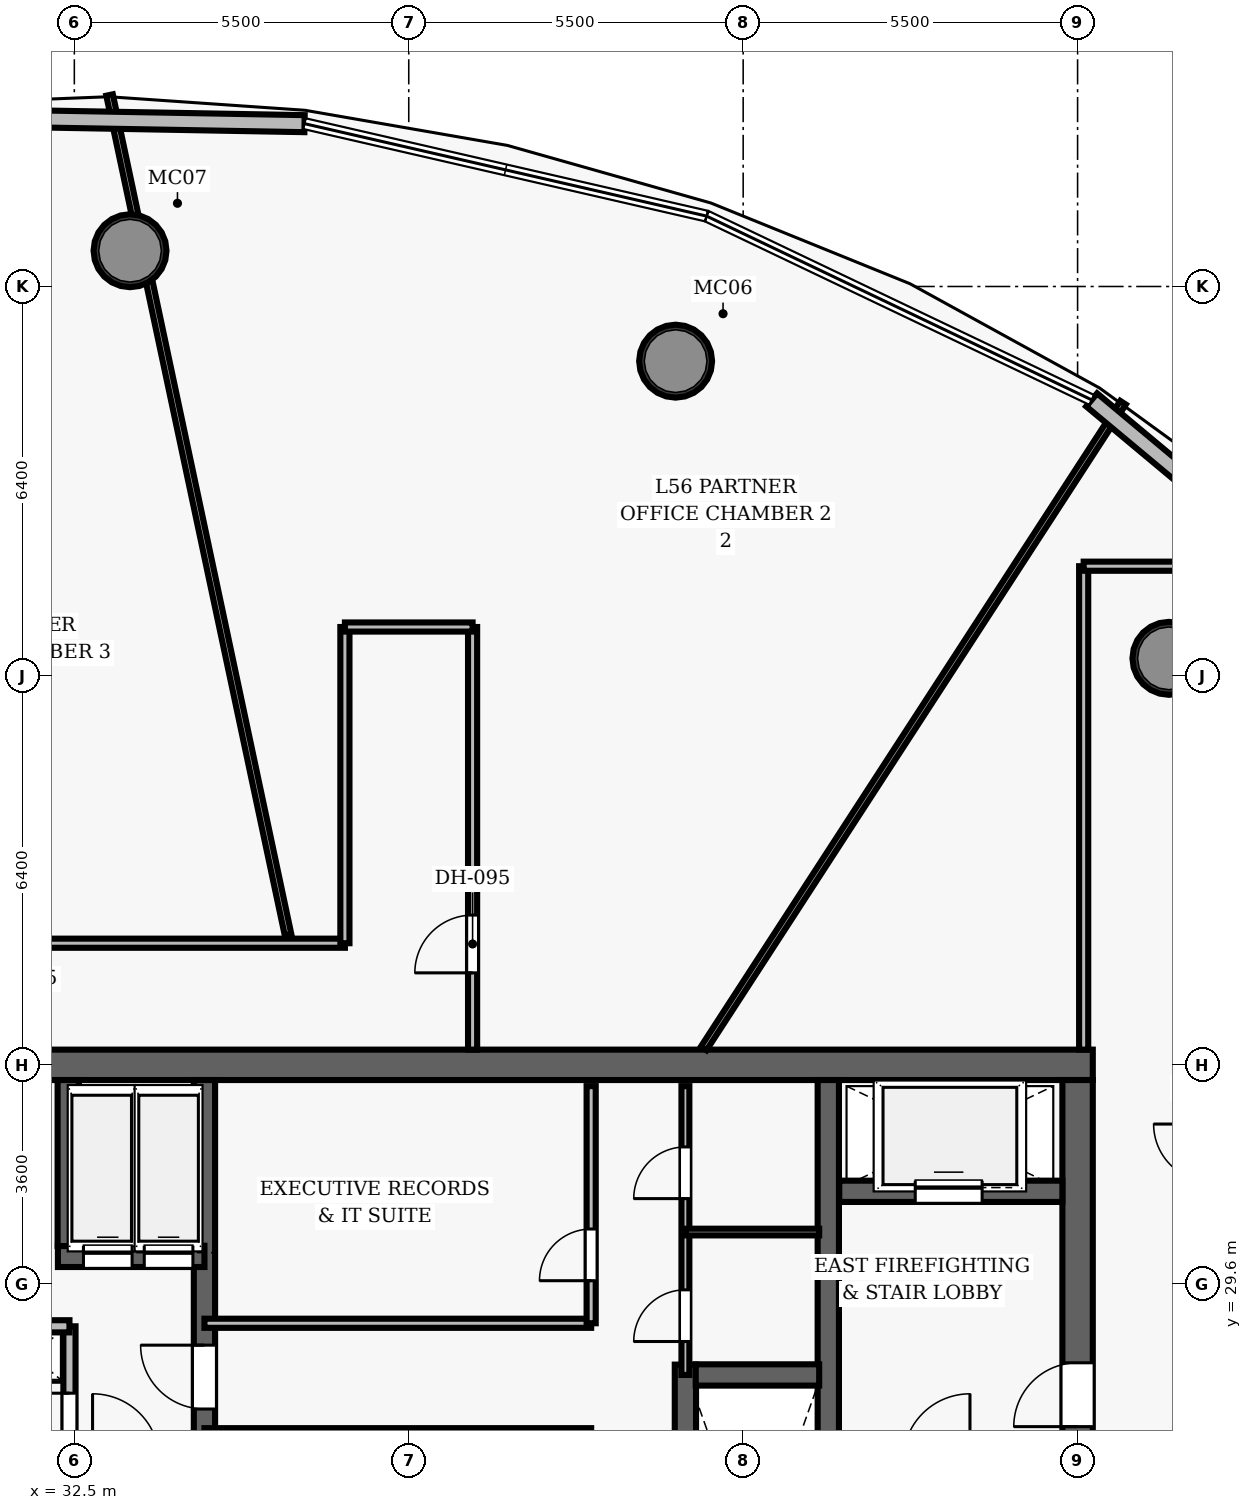
"""IFC4 building model, lengths in metres.
Left out: names, types, materials, properties, quantities, classifications, styles, units other than length and angle.
Written with IfcOpenShell. Run it as: python <this file> out.ifc"""

import sys

from ifc_helpers import new_model, si_unit, direction, frame, frame_2d, origin, origin_2d, place, context, subcontext, project, spatial, rectangle, hollow_circle, extrude, element, fill, save


model = new_model("IFC4")
c1 = context("Model", 3, precision=1e-05, world=origin(), true_north=direction((0.0, 1.0)))
c2 = subcontext(c1, "Body", "Model", "MODEL_VIEW")
j1 = project(units=[si_unit("LENGTHUNIT", "METRE"), si_unit("PLANEANGLEUNIT", "RADIAN")], contexts=[c1])
p1 = place(None, origin())
s1 = spatial("IfcSite", under=j1, at=p1, CompositionType="ELEMENT")
p2 = place(p1, origin())
s2 = spatial("IfcBuilding", under=s1, at=p2, CompositionType="ELEMENT")
p3 = place(p2, frame((0.0, 0.0, 221.25)))
s3 = spatial("IfcBuildingStorey", under=s2, at=p3, CompositionType="ELEMENT", Elevation=221.25)
p4 = place(p3, frame((26.75, 33.2, 0.0), z_axis=(0.0, 0.0, 1.0), x_axis=(1.0, 0.0, 0.0)))
e1 = element("IfcWall", 1, at=p4, inside=s3, PredefinedType="SHEAR", context=c2, shape_type="SweptSolid", body=[
    extrude(rectangle(XDim=22.5, YDim=0.5, at=frame_2d((11.25, 0.0))), origin(), (0.0, 0.0, 1.0), 3.85),
])
p5 = place(p3, frame((49.0, 19.05, 0.0), z_axis=(0.0, 0.0, 1.0), x_axis=(0.0, 1.0, 0.0)))
e2 = element("IfcWall", 2, at=p5, inside=s3, PredefinedType="SHEAR", context=c2, shape_type="SweptSolid", body=[
    extrude(rectangle(XDim=13.9, YDim=0.5, at=frame_2d((6.95, 0.0))), origin(), (0.0, 0.0, 1.0), 3.85),
])
p6 = place(p5, frame((8.2, 0.0, 0.0)))
e3 = element("IfcOpeningElement", 3, at=p6, cuts=e2, PredefinedType="OPENING", context=c2, shape_type="SweptSolid", body=[
    extrude(rectangle(XDim=1.05, YDim=2.15, at=frame_2d((0.525, 1.075))), frame((0.0, 0.26, 0.0), z_axis=(0.0, -1.0, 0.0), x_axis=(1.0, 0.0, 0.0)), (0.0, 0.0, 1.0), 0.52),
])
p7 = place(p3, frame((44.9, 19.05, 0.0), z_axis=(0.0, 0.0, 1.0), x_axis=(0.0, 1.0, 0.0)))
e4 = element("IfcWall", 4, at=p7, inside=s3, PredefinedType="SHEAR", context=c2, shape_type="SweptSolid", body=[
    extrude(rectangle(XDim=13.9, YDim=0.35, at=frame_2d((6.95, 0.0))), origin(), (0.0, 0.0, 1.0), 3.85),
])
for number, where, z_axis, x_axis in (
    (5, (50.502, 39.885, 0.0), (0.0, 0.0, 1.0), (1.0, 0.0, 0.0)),
    (6, (42.389, 44.772, 0.0), (0.0, 0.0, 1.0), (1.0, 0.0, 0.0)),
    (7, (33.416, 46.588, 0.0), (0.0, 0.0, 1.0), (1.0, 0.0, 0.0)),
):
    element("IfcColumn", number, at=place(p3, frame(where, z_axis=z_axis, x_axis=x_axis)), inside=s3, PredefinedType="COLUMN", context=c2, shape_type="SweptSolid", body=[
        extrude(hollow_circle(Radius=0.6, WallThickness=0.05, at=origin_2d()), origin(), (0.0, 0.0, 1.0), 3.85),
    ])
p8 = place(p3, frame((45.08, 31.12, 0.0), z_axis=(0.0, 0.0, 1.0), x_axis=(1.0, 0.0, 0.0)))
e8 = element("IfcWall", 8, at=p8, inside=s3, PredefinedType="SHEAR", context=c2, shape_type="SweptSolid", body=[
    extrude(rectangle(XDim=3.67, YDim=0.35, at=frame_2d((1.835, 0.0))), origin(), (0.0, 0.0, 1.0), 3.035),
])
p9 = place(p8, frame((1.25, 0.0, 0.0)))
e9 = element("IfcOpeningElement", 9, at=p9, cuts=e8, PredefinedType="OPENING", context=c2, shape_type="SweptSolid", body=[
    extrude(rectangle(XDim=1.1, YDim=2.15, at=frame_2d((0.55, 1.075))), frame((0.0, 0.185, 0.0), z_axis=(0.0, -1.0, 0.0), x_axis=(1.0, 0.0, 0.0)), (0.0, 0.0, 1.0), 0.37),
])
p10 = place(p3, frame((34.64, 26.69, 0.0), z_axis=(0.0, 0.0, 1.0), x_axis=(0.0, 1.0, 0.0)))
e10 = element("IfcWall", 10, at=p10, inside=s3, PredefinedType="SHEAR", context=c2, shape_type="SweptSolid", body=[
    extrude(rectangle(XDim=6.26, YDim=0.35, at=frame_2d((3.13, 0.0))), origin(), (0.0, 0.0, 1.0), 3.85),
])
p11 = place(p10, frame((0.85, 0.0, 0.0)))
e11 = element("IfcOpeningElement", 11, at=p11, cuts=e10, PredefinedType="OPENING", context=c2, shape_type="SweptSolid", body=[
    extrude(rectangle(XDim=1.05, YDim=2.15, at=frame_2d((0.525, 1.075))), frame((0.0, 0.185, 0.0), z_axis=(0.0, -1.0, 0.0), x_axis=(1.0, 0.0, 0.0)), (0.0, 0.0, 1.0), 0.37),
])
p12 = place(p3, frame((32.23, 30.05, 0.0), z_axis=(0.0, 0.0, 1.0), x_axis=(1.0, 0.0, 0.0)))
e12 = element("IfcWall", 12, at=p12, inside=s3, PredefinedType="SHEAR", context=c2, shape_type="SweptSolid", body=[
    extrude(rectangle(XDim=2.41, YDim=0.35, at=frame_2d((1.205, 0.0))), origin(), (0.0, 0.0, 1.0), 3.035),
])
p13 = place(p12, frame((0.42, 0.0, 0.0)))
e13 = element("IfcOpeningElement", 13, at=p13, cuts=e12, PredefinedType="OPENING", context=c2, shape_type="SweptSolid", body=[
    extrude(rectangle(XDim=0.8, YDim=2.15, at=frame_2d((0.4, 1.075))), frame((0.0, 0.185, 0.0), z_axis=(0.0, -1.0, 0.0), x_axis=(1.0, 0.0, 0.0)), (0.0, 0.0, 1.0), 0.37),
])
p14 = place(p12, frame((1.42, 0.0, 0.0)))
e14 = element("IfcOpeningElement", 14, at=p14, cuts=e12, PredefinedType="OPENING", context=c2, shape_type="SweptSolid", body=[
    extrude(rectangle(XDim=0.8, YDim=2.15, at=frame_2d((0.4, 1.075))), frame((0.0, 0.185, 0.0), z_axis=(0.0, -1.0, 0.0), x_axis=(1.0, 0.0, 0.0)), (0.0, 0.0, 1.0), 0.37),
])
p15 = place(p3, frame((32.4, 30.22, 0.0), z_axis=(0.0, 0.0, 1.0), x_axis=(0.0, 1.0, 0.0)))
e15 = element("IfcWall", 15, at=p15, inside=s3, PredefinedType="SHEAR", context=c2, shape_type="SweptSolid", body=[
    extrude(rectangle(XDim=2.73, YDim=0.35, at=frame_2d((1.365, 0.0))), origin(), (0.0, 0.0, 1.0), 3.035),
])
p16 = place(p3, frame((32.42, 26.86, 0.0), z_axis=(0.0, 0.0, 1.0), x_axis=(0.0, 1.0, 0.0)))
e16 = element("IfcWall", 16, at=p16, inside=s3, PredefinedType="PARTITIONING", context=c2, shape_type="SweptSolid", body=[
    extrude(rectangle(XDim=2.04, YDim=0.2, at=frame_2d((1.02, 0.0))), origin(), (0.0, 0.0, 1.0), 3.035),
])
p17 = place(p16, frame((0.14, 0.0, 0.0)))
e17 = element("IfcOpeningElement", 17, at=p17, cuts=e16, PredefinedType="OPENING", context=c2, shape_type="SweptSolid", body=[
    extrude(rectangle(XDim=0.8, YDim=2.05, at=frame_2d((0.4, 1.025))), frame((0.0, 0.11, 0.0), z_axis=(0.0, -1.0, 0.0), x_axis=(1.0, 0.0, 0.0)), (0.0, 0.0, 1.0), 0.22),
])
p18 = place(p3, frame((31.3, 28.9, 0.0), z_axis=(0.0, 0.0, 1.0), x_axis=(1.0, 0.0, 0.0)))
e18 = element("IfcWall", 18, at=p18, inside=s3, PredefinedType="PARTITIONING", context=c2, shape_type="SweptSolid", body=[
    extrude(rectangle(XDim=1.12, YDim=0.2, at=frame_2d((0.56, 0.0))), origin(), (0.0, 0.0, 1.0), 3.035),
])
p19 = place(p3, frame((42.55, 21.73, 0.0), z_axis=(0.0, 0.0, 1.0), x_axis=(0.0, 1.0, 0.0)))
e19 = element("IfcWall", 19, at=p19, inside=s3, PredefinedType="SHEAR", context=c2, shape_type="SweptSolid", body=[
    extrude(rectangle(XDim=6.54, YDim=0.35, at=frame_2d((3.27, 0.0))), origin(), (0.0, 0.0, 1.0), 3.035),
])
p20 = place(p3, frame((42.72, 28.1, 0.0), z_axis=(0.0, 0.0, 1.0), x_axis=(1.0, 0.0, 0.0)))
e20 = element("IfcWall", 20, at=p20, inside=s3, PredefinedType="SHEAR", context=c2, shape_type="SweptSolid", body=[
    extrude(rectangle(XDim=2.03, YDim=0.35, at=frame_2d((1.015, 0.0))), origin(), (0.0, 0.0, 1.0), 3.035),
])
for number, where, z_axis, x_axis in (
    (21, (34.64, 27.15, 0.0), (0.0, 0.0, 1.0), (1.0, 0.0, 0.0)),
    (22, (34.64, 28.95, 0.0), (0.0, 0.0, 1.0), (1.0, 0.0, 0.0)),
):
    element("IfcWall", number, at=place(p3, frame(where, z_axis=z_axis, x_axis=x_axis)), inside=s3, PredefinedType="PARTITIONING", context=c2, shape_type="SweptSolid", body=[
        extrude(rectangle(XDim=6.36, YDim=0.15, at=frame_2d((3.18, 0.0))), origin(), (0.0, 0.0, 1.0), 3.035),
    ])
p21 = place(p3, frame((41.0, 28.95, 0.0), z_axis=(0.0, 0.0, 1.0), x_axis=(0.0, 1.0, 0.0)))
e23 = element("IfcWall", 23, at=p21, inside=s3, PredefinedType="PARTITIONING", context=c2, shape_type="SweptSolid", body=[
    extrude(rectangle(XDim=3.9, YDim=0.15, at=frame_2d((1.95, 0.0))), origin(), (0.0, 0.0, 1.0), 3.035),
])
p22 = place(p21, frame((0.7, 0.0, 0.0)))
e24 = element("IfcOpeningElement", 24, at=p22, cuts=e23, PredefinedType="OPENING", context=c2, shape_type="SweptSolid", body=[
    extrude(rectangle(XDim=0.85, YDim=2.1, at=frame_2d((0.425, 1.05))), frame((0.0, 0.085, 0.0), z_axis=(0.0, -1.0, 0.0), x_axis=(1.0, 0.0, 0.0)), (0.0, 0.0, 1.0), 0.17),
])
p23 = place(p3, frame((42.55, 28.1, 0.0), z_axis=(0.0, 0.0, 1.0), x_axis=(0.0, 1.0, 0.0)))
e25 = element("IfcWall", 25, at=p23, inside=s3, PredefinedType="PARTITIONING", context=c2, shape_type="SweptSolid", body=[
    extrude(rectangle(XDim=4.75, YDim=0.13, at=frame_2d((2.375, 0.0))), origin(), (0.0, 0.0, 1.0), 3.035),
])
p24 = place(p23, frame((0.55, 0.0, 0.0)))
e26 = element("IfcOpeningElement", 26, at=p24, cuts=e25, PredefinedType="OPENING", context=c2, shape_type="SweptSolid", body=[
    extrude(rectangle(XDim=0.85, YDim=2.1, at=frame_2d((0.425, 1.05))), frame((0.0, 0.075, 0.0), z_axis=(0.0, -1.0, 0.0), x_axis=(1.0, 0.0, 0.0)), (0.0, 0.0, 1.0), 0.15),
])
p25 = place(p23, frame((2.9, 0.0, 0.0)))
e27 = element("IfcOpeningElement", 27, at=p25, cuts=e25, PredefinedType="OPENING", context=c2, shape_type="SweptSolid", body=[
    extrude(rectangle(XDim=0.85, YDim=2.1, at=frame_2d((0.425, 1.05))), frame((0.0, 0.075, 0.0), z_axis=(0.0, -1.0, 0.0), x_axis=(1.0, 0.0, 0.0)), (0.0, 0.0, 1.0), 0.15),
])
p26 = place(p3, frame((42.55, 30.45, 0.0), z_axis=(0.0, 0.0, 1.0), x_axis=(1.0, 0.0, 0.0)))
e28 = element("IfcWall", 28, at=p26, inside=s3, PredefinedType="PARTITIONING", context=c2, shape_type="SweptSolid", body=[
    extrude(rectangle(XDim=2.2, YDim=0.11, at=frame_2d((1.1, 0.0))), origin(), (0.0, 0.0, 1.0), 3.035),
])
p27 = place(p3, frame((26.9, 35.2, 0.0), z_axis=(0.0, 0.0, 1.0), x_axis=(1.0, 0.0, 0.0)))
e29 = element("IfcWall", 29, at=p27, inside=s3, PredefinedType="PARTITIONING", context=c2, shape_type="SweptSolid", body=[
    extrude(rectangle(XDim=10.05, YDim=0.15, at=frame_2d((5.025, 0.0))), origin(), (0.0, 0.0, 1.0), 3.035),
])
p28 = place(p27, frame((4.233, 0.0, 0.0)))
e30 = element("IfcOpeningElement", 30, at=p28, cuts=e29, PredefinedType="OPENING", context=c2, shape_type="SweptSolid", body=[
    extrude(rectangle(XDim=0.95, YDim=2.15, at=frame_2d((0.475, 1.075))), frame((0.0, 0.085, 0.0), z_axis=(0.0, -1.0, 0.0), x_axis=(1.0, 0.0, 0.0)), (0.0, 0.0, 1.0), 0.17),
])
p29 = place(p3, frame((49.1, 33.45, 0.0), z_axis=(0.0, 0.0, 1.0), x_axis=(0.0, 1.0, 0.0)))
e31 = element("IfcWall", 31, at=p29, inside=s3, PredefinedType="PARTITIONING", context=c2, shape_type="SweptSolid", body=[
    extrude(rectangle(XDim=7.95, YDim=0.15, at=frame_2d((3.975, 0.0))), origin(), (0.0, 0.0, 1.0), 3.035),
])
p30 = place(p3, frame((49.1, 41.4, 0.0), z_axis=(0.0, 0.0, 1.0), x_axis=(1.0, 0.0, 0.0)))
e32 = element("IfcWall", 32, at=p30, inside=s3, PredefinedType="PARTITIONING", context=c2, shape_type="SweptSolid", body=[
    extrude(rectangle(XDim=2.1, YDim=0.15, at=frame_2d((1.05, 0.0))), origin(), (0.0, 0.0, 1.0), 3.035),
])
p31 = place(p3, frame((36.95, 35.2, 0.0), z_axis=(0.0, 0.0, 1.0), x_axis=(0.0, 1.0, 0.0)))
e33 = element("IfcWall", 33, at=p31, inside=s3, PredefinedType="PARTITIONING", context=c2, shape_type="SweptSolid", body=[
    extrude(rectangle(XDim=5.2, YDim=0.15, at=frame_2d((2.6, 0.0))), origin(), (0.0, 0.0, 1.0), 3.035),
])
p32 = place(p3, frame((39.05, 33.45, 0.0), z_axis=(0.0, 0.0, 1.0), x_axis=(0.0, 1.0, 0.0)))
e34 = element("IfcWall", 34, at=p32, inside=s3, PredefinedType="PARTITIONING", context=c2, shape_type="SweptSolid", body=[
    extrude(rectangle(XDim=6.95, YDim=0.15, at=frame_2d((3.475, 0.0))), origin(), (0.0, 0.0, 1.0), 3.035),
])
p33 = place(p32, frame((1.262, 0.0, 0.0)))
e35 = element("IfcOpeningElement", 35, at=p33, cuts=e34, PredefinedType="OPENING", context=c2, shape_type="SweptSolid", body=[
    extrude(rectangle(XDim=0.95, YDim=2.15, at=frame_2d((0.475, 1.075))), frame((0.0, 0.085, 0.0), z_axis=(0.0, -1.0, 0.0), x_axis=(1.0, 0.0, 0.0)), (0.0, 0.0, 1.0), 0.17),
])
p34 = place(p3, frame((36.95, 40.4, 0.0), z_axis=(0.0, 0.0, 1.0), x_axis=(1.0, 0.0, 0.0)))
e36 = element("IfcWall", 36, at=p34, inside=s3, PredefinedType="PARTITIONING", context=c2, shape_type="SweptSolid", body=[
    extrude(rectangle(XDim=2.1, YDim=0.15, at=frame_2d((1.05, 0.0))), origin(), (0.0, 0.0, 1.0), 3.035),
])
p35 = place(p3, frame((42.851, 33.47, 0.0), z_axis=(0.0, 0.0, 1.0), x_axis=(0.544635209489, 0.838673052259, 0.0)))
e37 = element("IfcWall", 37, at=p35, inside=s3, PredefinedType="PARTITIONING", context=c2, shape_type="SweptSolid", body=[
    extrude(rectangle(XDim=12.662, YDim=0.11, at=frame_2d((6.331, 0.0))), origin(), (0.0, 0.0, 1.0), 3.035),
])
p36 = place(p3, frame((36.015, 35.34, 0.0), z_axis=(0.0, 0.0, 1.0), x_axis=(-0.207901362198, 0.978149796093, 0.0)))
e38 = element("IfcWall", 38, at=p36, inside=s3, PredefinedType="PARTITIONING", context=c2, shape_type="SweptSolid", body=[
    extrude(rectangle(XDim=14.117, YDim=0.11, at=frame_2d((7.059, 0.0))), origin(), (0.0, 0.0, 1.0), 3.035),
])
p37 = place(p3, frame((49.232, 44.135, 0.0), z_axis=(0.0, 0.0, 1.0), x_axis=(0.767687026112, -0.640824960453, 0.0)))
e39 = element("IfcWall", 39, at=p37, inside=s3, PredefinedType="SOLIDWALL", context=c2, shape_type="SweptSolid", body=[
    extrude(rectangle(XDim=7.045, YDim=0.28, at=frame_2d((3.523, 0.0))), origin(), (0.0, 0.0, 1.0), 3.62),
])
p38 = place(p3, frame((30.061, 48.789, 0.0), z_axis=(0.0, 0.0, 1.0), x_axis=(0.999840836748, -0.01784099693, 0.0)))
e40 = element("IfcWall", 40, at=p38, inside=s3, PredefinedType="SOLIDWALL", context=c2, shape_type="SweptSolid", body=[
    extrude(rectangle(XDim=6.226, YDim=0.28, at=frame_2d((3.113, 0.0))), origin(), (0.0, 0.0, 1.0), 3.62),
])
p39 = place(p6, origin())
e41 = element("IfcDoor", 41, at=p39, inside=s3, OperationType="SINGLE_SWING_LEFT", PredefinedType="DOOR", context=c2, shape_type="SweptSolid", body=[
    extrude(rectangle(XDim=1.05, YDim=2.15, at=frame_2d((0.525, 1.075))), frame((0.0, 0.025, 0.0), z_axis=(0.0, -1.0, 0.0), x_axis=(1.0, 0.0, 0.0)), (0.0, 0.0, 1.0), 0.05),
])
fill(e3, e41)
p40 = place(p17, origin())
e42 = element("IfcDoor", 42, at=p40, inside=s3, OperationType="SINGLE_SWING_RIGHT", PredefinedType="DOOR", context=c2, shape_type="SweptSolid", body=[
    extrude(rectangle(XDim=0.8, YDim=2.05, at=frame_2d((0.4, 1.025))), frame((0.0, 0.025, 0.0), z_axis=(0.0, -1.0, 0.0), x_axis=(1.0, 0.0, 0.0)), (0.0, 0.0, 1.0), 0.05),
])
fill(e17, e42)
p41 = place(p11, origin())
e43 = element("IfcDoor", 43, at=p41, inside=s3, OperationType="SINGLE_SWING_RIGHT", PredefinedType="DOOR", context=c2, shape_type="SweptSolid", body=[
    extrude(rectangle(XDim=1.05, YDim=2.15, at=frame_2d((0.525, 1.075))), frame((0.0, 0.025, 0.0), z_axis=(0.0, -1.0, 0.0), x_axis=(1.0, 0.0, 0.0)), (0.0, 0.0, 1.0), 0.05),
])
fill(e11, e43)
p42 = place(p22, origin())
e44 = element("IfcDoor", 44, at=p42, inside=s3, OperationType="SINGLE_SWING_LEFT", PredefinedType="DOOR", context=c2, shape_type="SweptSolid", body=[
    extrude(rectangle(XDim=0.85, YDim=2.1, at=frame_2d((0.425, 1.05))), frame((0.0, 0.025, 0.0), z_axis=(0.0, -1.0, 0.0), x_axis=(1.0, 0.0, 0.0)), (0.0, 0.0, 1.0), 0.05),
])
fill(e24, e44)
p43 = place(p24, origin())
e45 = element("IfcDoor", 45, at=p43, inside=s3, OperationType="SINGLE_SWING_LEFT", PredefinedType="DOOR", context=c2, shape_type="SweptSolid", body=[
    extrude(rectangle(XDim=0.85, YDim=2.1, at=frame_2d((0.425, 1.05))), frame((0.0, 0.025, 0.0), z_axis=(0.0, -1.0, 0.0), x_axis=(1.0, 0.0, 0.0)), (0.0, 0.0, 1.0), 0.05),
])
fill(e26, e45)
p44 = place(p25, origin())
e46 = element("IfcDoor", 46, at=p44, inside=s3, OperationType="SINGLE_SWING_LEFT", PredefinedType="DOOR", context=c2, shape_type="SweptSolid", body=[
    extrude(rectangle(XDim=0.85, YDim=2.1, at=frame_2d((0.425, 1.05))), frame((0.0, 0.025, 0.0), z_axis=(0.0, -1.0, 0.0), x_axis=(1.0, 0.0, 0.0)), (0.0, 0.0, 1.0), 0.05),
])
fill(e27, e46)
p45 = place(p33, origin())
e47 = element("IfcDoor", 47, at=p45, inside=s3, OperationType="SINGLE_SWING_LEFT", PredefinedType="DOOR", context=c2, shape_type="SweptSolid", body=[
    extrude(rectangle(XDim=0.95, YDim=2.15, at=frame_2d((0.475, 1.075))), frame((0.0, 0.025, 0.0), z_axis=(0.0, -1.0, 0.0), x_axis=(1.0, 0.0, 0.0)), (0.0, 0.0, 1.0), 0.05),
])
fill(e35, e47)
p46 = place(p9, origin())
e48 = element("IfcDoor", 48, at=p46, inside=s3, OperationType="SLIDING_TO_LEFT", PredefinedType="DOOR", context=c2, shape_type="SweptSolid", body=[
    extrude(rectangle(XDim=1.1, YDim=2.15, at=frame_2d((0.55, 1.075))), frame((0.0, 0.025, 0.0), z_axis=(0.0, -1.0, 0.0), x_axis=(1.0, 0.0, 0.0)), (0.0, 0.0, 1.0), 0.05),
])
fill(e9, e48)
p47 = place(p13, origin())
e49 = element("IfcDoor", 49, at=p47, inside=s3, OperationType="SLIDING_TO_LEFT", PredefinedType="DOOR", context=c2, shape_type="SweptSolid", body=[
    extrude(rectangle(XDim=0.8, YDim=2.15, at=frame_2d((0.4, 1.075))), frame((0.0, 0.025, 0.0), z_axis=(0.0, -1.0, 0.0), x_axis=(1.0, 0.0, 0.0)), (0.0, 0.0, 1.0), 0.05),
])
fill(e13, e49)
p48 = place(p14, origin())
e50 = element("IfcDoor", 50, at=p48, inside=s3, OperationType="SLIDING_TO_LEFT", PredefinedType="DOOR", context=c2, shape_type="SweptSolid", body=[
    extrude(rectangle(XDim=0.8, YDim=2.15, at=frame_2d((0.4, 1.075))), frame((0.0, 0.025, 0.0), z_axis=(0.0, -1.0, 0.0), x_axis=(1.0, 0.0, 0.0)), (0.0, 0.0, 1.0), 0.05),
])
fill(e14, e50)
save(model, sys.argv[1])
